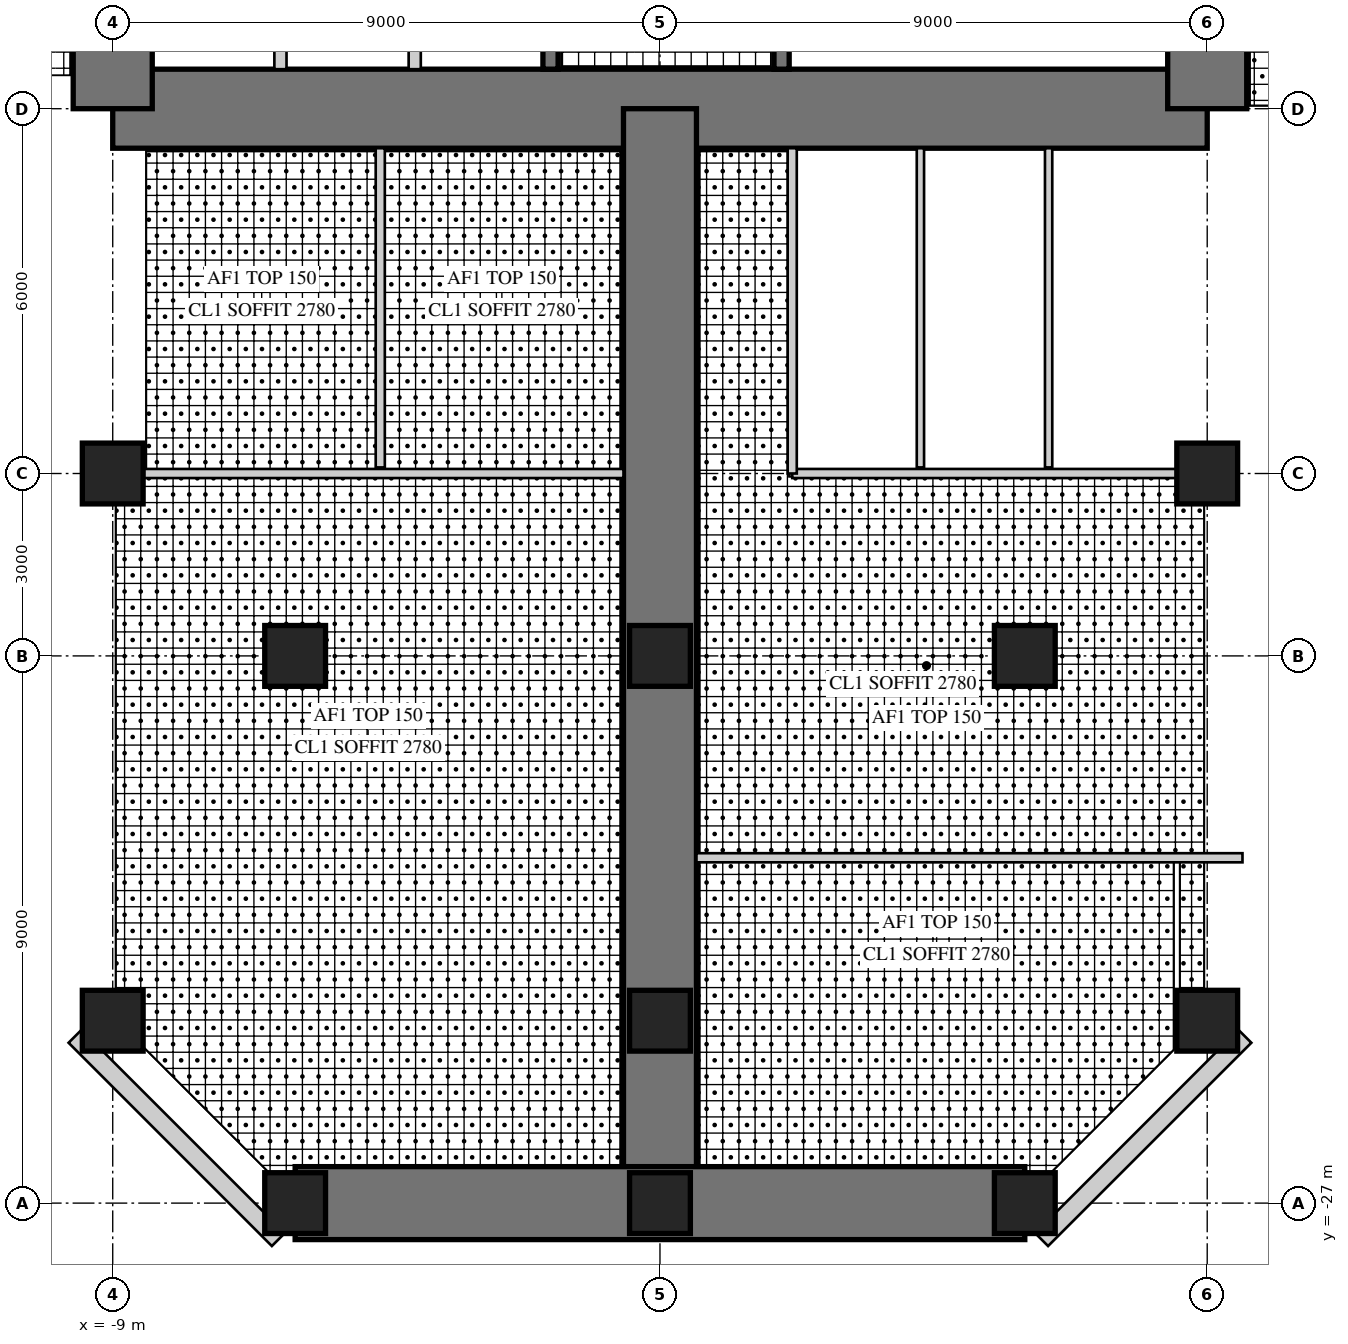
"""IFC4 building model, lengths in metres.
Left out: names, types, materials, properties, quantities, classifications, styles, units other than length and angle.
Written with IfcOpenShell. Run it as: python <this file> out.ifc"""

import sys

from ifc_helpers import new_model, si_unit, direction, frame, frame_2d, origin, origin_2d, place, context, subcontext, project, spatial, rectangle, hollow_rectangle, extrude, element, fill, save


model = new_model("IFC4")
c1 = context("Model", 3, precision=1e-05, world=origin(), true_north=direction((0.0, 1.0)))
c2 = subcontext(c1, "Body", "Model", "MODEL_VIEW")
j1 = project(units=[si_unit("LENGTHUNIT", "METRE"), si_unit("PLANEANGLEUNIT", "RADIAN")], contexts=[c1])
p1 = place(None, origin())
s1 = spatial("IfcSite", under=j1, at=p1, CompositionType="ELEMENT")
p2 = place(p1, origin())
s2 = spatial("IfcBuilding", under=s1, at=p2, CompositionType="ELEMENT")
p3 = place(p2, frame((0.0, 0.0, 116.5)))
s3 = spatial("IfcBuildingStorey", under=s2, at=p3, CompositionType="ELEMENT", Elevation=116.5)
p4 = place(p3, frame((-9.0, -9.0, 0.0), z_axis=(0.0, 0.0, 1.0), x_axis=(1.0, 0.0, 0.0)))
e1 = element("IfcWall", 1, at=p4, inside=s3, PredefinedType="SHEAR", context=c2, shape_type="SweptSolid", body=[
    extrude(rectangle(XDim=18.0, YDim=1.3, at=frame_2d((9.0, 0.0))), origin(), (0.0, 0.0, 1.0), 4.0),
])
p5 = place(p4, frame((9.8, 0.0, 0.0)))
e2 = element("IfcOpeningElement", 2, at=p5, cuts=e1, PredefinedType="OPENING", context=c2, shape_type="SweptSolid", body=[
    extrude(rectangle(XDim=1.0, YDim=2.4, at=frame_2d((0.5, 1.2))), frame((0.0, 0.66, 0.0), z_axis=(0.0, -1.0, 0.0), x_axis=(1.0, 0.0, 0.0)), (0.0, 0.0, 1.0), 1.32),
])
p6 = place(p3, frame((9.0, -9.0, 0.0), z_axis=(0.0, 0.0, 1.0), x_axis=(0.0, 1.0, 0.0)))
e3 = element("IfcWall", 3, at=p6, inside=s3, PredefinedType="SHEAR", context=c2, shape_type="SweptSolid", body=[
    extrude(rectangle(XDim=18.0, YDim=1.3, at=frame_2d((9.0, 0.0))), origin(), (0.0, 0.0, 1.0), 4.0),
])
p7 = place(p6, frame((9.8, 0.0, 0.0)))
e4 = element("IfcOpeningElement", 4, at=p7, cuts=e3, PredefinedType="OPENING", context=c2, shape_type="SweptSolid", body=[
    extrude(rectangle(XDim=1.0, YDim=2.4, at=frame_2d((0.5, 1.2))), frame((0.0, 0.66, 0.0), z_axis=(0.0, -1.0, 0.0), x_axis=(1.0, 0.0, 0.0)), (0.0, 0.0, 1.0), 1.32),
])
p8 = place(p3, frame((-9.0, 9.0, 0.0), z_axis=(0.0, 0.0, 1.0), x_axis=(0.0, -1.0, 0.0)))
e5 = element("IfcWall", 5, at=p8, inside=s3, PredefinedType="SHEAR", context=c2, shape_type="SweptSolid", body=[
    extrude(rectangle(XDim=18.0, YDim=1.3, at=frame_2d((9.0, 0.0))), origin(), (0.0, 0.0, 1.0), 4.0),
])
p9 = place(p8, frame((9.8, 0.0, 0.0)))
e6 = element("IfcOpeningElement", 6, at=p9, cuts=e5, PredefinedType="OPENING", context=c2, shape_type="SweptSolid", body=[
    extrude(rectangle(XDim=1.0, YDim=2.4, at=frame_2d((0.5, 1.2))), frame((0.0, 0.66, 0.0), z_axis=(0.0, -1.0, 0.0), x_axis=(1.0, 0.0, 0.0)), (0.0, 0.0, 1.0), 1.32),
])
p10 = place(p3, frame((-1.8, -1.875, 0.0), z_axis=(0.0, 0.0, 1.0), x_axis=(0.0, -1.0, 0.0)))
e7 = element("IfcWall", 7, at=p10, inside=s3, PredefinedType="SHEAR", context=c2, shape_type="SweptSolid", body=[
    extrude(rectangle(XDim=6.475, YDim=0.25, at=frame_2d((3.238, 0.0))), origin(), (0.0, 0.0, 1.0), 4.0),
])
p11 = place(p10, frame((1.875, 0.0, 0.0)))
e8 = element("IfcOpeningElement", 8, at=p11, cuts=e7, PredefinedType="OPENING", context=c2, shape_type="SweptSolid", body=[
    extrude(rectangle(XDim=1.6, YDim=2.4, at=frame_2d((0.8, 1.2))), frame((0.0, 0.135, 0.0), z_axis=(0.0, -1.0, 0.0), x_axis=(1.0, 0.0, 0.0)), (0.0, 0.0, 1.0), 0.27),
])
for number, where, z_axis, x_axis in (
    (9, (-4.033, -5.975, 0.0), (0.0, 0.0, 1.0), (0.0, -1.0, 0.0)),
    (10, (-6.242, -5.975, 0.0), (0.0, 0.0, 1.0), (0.0, -1.0, 0.0)),
):
    element("IfcWall", number, at=place(p3, frame(where, z_axis=z_axis, x_axis=x_axis)), inside=s3, PredefinedType="PARTITIONING", context=c2, shape_type="SweptSolid", body=[
        extrude(rectangle(XDim=2.375, YDim=0.2, at=frame_2d((1.188, 0.0))), origin(), (0.0, 0.0, 1.0), 4.0),
    ])
p12 = place(p3, frame((2.0, -1.675, 0.0), z_axis=(0.0, 0.0, 1.0), x_axis=(0.0, -1.0, 0.0)))
e11 = element("IfcWall", 11, at=p12, inside=s3, PredefinedType="SHEAR", context=c2, shape_type="SweptSolid", body=[
    extrude(rectangle(XDim=6.675, YDim=0.25, at=frame_2d((3.337, 0.0))), origin(), (0.0, 0.0, 1.0), 4.0),
])
p13 = place(p12, frame((0.725, 0.0, 0.0)))
e12 = element("IfcOpeningElement", 12, at=p13, cuts=e11, PredefinedType="OPENING", context=c2, shape_type="SweptSolid", body=[
    extrude(rectangle(XDim=1.0, YDim=2.1, at=frame_2d((0.5, 1.05))), frame((0.0, 0.135, 0.0), z_axis=(0.0, -1.0, 0.0), x_axis=(1.0, 0.0, 0.0)), (0.0, 0.0, 1.0), 0.27),
])
p14 = place(p3, frame((0.0, -9.0, 0.0), z_axis=(0.0, 0.0, 1.0), x_axis=(0.0, -1.0, 0.0)))
e13 = element("IfcWall", 13, at=p14, inside=s3, PredefinedType="SHEAR", context=c2, shape_type="SweptSolid", body=[
    extrude(rectangle(XDim=18.0, YDim=1.2, at=frame_2d((9.0, 0.0))), origin(), (0.0, 0.0, 1.0), 4.0),
])
p15 = place(p14, frame((9.8, 0.0, 0.0)))
e14 = element("IfcOpeningElement", 14, at=p15, cuts=e13, PredefinedType="OPENING", context=c2, shape_type="SweptSolid", body=[
    extrude(rectangle(XDim=1.0, YDim=2.2, at=frame_2d((0.5, 1.1))), frame((0.0, 0.61, 0.0), z_axis=(0.0, -1.0, 0.0), x_axis=(1.0, 0.0, 0.0)), (0.0, 0.0, 1.0), 1.22),
])
p16 = place(p3, frame((-6.0, -27.0, 0.0), z_axis=(0.0, 0.0, 1.0), x_axis=(1.0, 0.0, 0.0)))
e15 = element("IfcWall", 15, at=p16, inside=s3, PredefinedType="SHEAR", context=c2, shape_type="SweptSolid", body=[
    extrude(rectangle(XDim=12.0, YDim=1.2, at=frame_2d((6.0, 0.0))), origin(), (0.0, 0.0, 1.0), 4.0),
])
p17 = place(p16, frame((1.55, 0.0, 0.6)))
e16 = element("IfcOpeningElement", 16, at=p17, cuts=e15, PredefinedType="OPENING", context=c2, shape_type="SweptSolid", body=[
    extrude(rectangle(XDim=3.0, YDim=2.4, at=frame_2d((1.5, 1.2))), frame((0.0, 0.61, 0.0), z_axis=(0.0, -1.0, 0.0), x_axis=(1.0, 0.0, 0.0)), (0.0, 0.0, 1.0), 1.22),
])
p18 = place(p16, frame((7.45, 0.0, 0.6)))
e17 = element("IfcOpeningElement", 17, at=p18, cuts=e15, PredefinedType="OPENING", context=c2, shape_type="SweptSolid", body=[
    extrude(rectangle(XDim=3.0, YDim=2.4, at=frame_2d((1.5, 1.2))), frame((0.0, 0.61, 0.0), z_axis=(0.0, -1.0, 0.0), x_axis=(1.0, 0.0, 0.0)), (0.0, 0.0, 1.0), 1.22),
])
for number, where, z_axis, x_axis in (
    (18, (-9.0, -15.0, 0.0), (0.0, 0.0, 1.0), (1.0, 0.0, 0.0)),
    (19, (-9.0, -24.0, 0.0), (0.0, 0.0, 1.0), (1.0, 0.0, 0.0)),
    (20, (9.0, -15.0, 0.0), (0.0, 0.0, 1.0), (1.0, 0.0, 0.0)),
    (21, (9.0, -24.0, 0.0), (0.0, 0.0, 1.0), (1.0, 0.0, 0.0)),
    (22, (-6.0, -27.0, 0.0), (0.0, 0.0, 1.0), (1.0, 0.0, 0.0)),
    (23, (0.0, -27.0, 0.0), (0.0, 0.0, 1.0), (1.0, 0.0, 0.0)),
    (24, (6.0, -27.0, 0.0), (0.0, 0.0, 1.0), (1.0, 0.0, 0.0)),
    (25, (-6.0, -18.0, 0.0), (0.0, 0.0, 1.0), (1.0, 0.0, 0.0)),
    (26, (0.0, -18.0, 0.0), (0.0, 0.0, 1.0), (1.0, 0.0, 0.0)),
    (27, (6.0, -18.0, 0.0), (0.0, 0.0, 1.0), (1.0, 0.0, 0.0)),
    (28, (0.0, -24.0, 0.0), (0.0, 0.0, 1.0), (1.0, 0.0, 0.0)),
):
    element("IfcColumn", number, at=place(p3, frame(where, z_axis=z_axis, x_axis=x_axis)), inside=s3, PredefinedType="COLUMN", context=c2, shape_type="SweptSolid", body=[
        extrude(rectangle(XDim=1.0, YDim=1.0, at=origin_2d()), origin(), (0.0, 0.0, 1.0), 4.0),
    ])
p19 = place(p3, frame((-9.62, -24.257, 0.0), z_axis=(0.0, 0.0, 1.0), x_axis=(0.707106781187, -0.707106781187, 0.0)))
e29 = element("IfcWall", 29, at=p19, inside=s3, PredefinedType="SOLIDWALL", context=c2, shape_type="SweptSolid", body=[
    extrude(rectangle(XDim=4.728, YDim=0.3, at=frame_2d((2.364, 0.0))), origin(), (0.0, 0.0, 1.0), 3.8),
])
p20 = place(p19, frame((1.914, 0.0, 0.3)))
e30 = element("IfcOpeningElement", 30, at=p20, cuts=e29, PredefinedType="OPENING", context=c2, shape_type="SweptSolid", body=[
    extrude(rectangle(XDim=0.9, YDim=2.4, at=frame_2d((0.45, 1.2))), frame((0.0, 0.16, 0.0), z_axis=(0.0, -1.0, 0.0), x_axis=(1.0, 0.0, 0.0)), (0.0, 0.0, 1.0), 0.32),
])
p21 = place(p3, frame((6.277, -27.6, 0.0), z_axis=(0.0, 0.0, 1.0), x_axis=(0.707106781187, 0.707106781187, 0.0)))
e31 = element("IfcWall", 31, at=p21, inside=s3, PredefinedType="SOLIDWALL", context=c2, shape_type="SweptSolid", body=[
    extrude(rectangle(XDim=4.728, YDim=0.3, at=frame_2d((2.364, 0.0))), origin(), (0.0, 0.0, 1.0), 3.8),
])
p22 = place(p21, frame((1.914, 0.0, 0.3)))
e32 = element("IfcOpeningElement", 32, at=p22, cuts=e31, PredefinedType="OPENING", context=c2, shape_type="SweptSolid", body=[
    extrude(rectangle(XDim=0.9, YDim=2.4, at=frame_2d((0.45, 1.2))), frame((0.0, 0.16, 0.0), z_axis=(0.0, -1.0, 0.0), x_axis=(1.0, 0.0, 0.0)), (0.0, 0.0, 1.0), 0.32),
])
p23 = place(p3, frame((2.175, -15.0, 0.0), z_axis=(0.0, 0.0, 1.0), x_axis=(1.0, 0.0, 0.0)))
e33 = element("IfcWall", 33, at=p23, inside=s3, PredefinedType="PARTITIONING", context=c2, shape_type="SweptSolid", body=[
    extrude(rectangle(XDim=6.325, YDim=0.15, at=frame_2d((3.163, 0.0))), origin(), (0.0, 0.0, 1.0), 3.0),
])
p24 = place(p23, frame((0.554, 0.0, 0.0)))
e34 = element("IfcOpeningElement", 34, at=p24, cuts=e33, PredefinedType="OPENING", context=c2, shape_type="SweptSolid", body=[
    extrude(rectangle(XDim=1.0, YDim=2.1, at=frame_2d((0.5, 1.05))), frame((0.0, 0.085, 0.0), z_axis=(0.0, -1.0, 0.0), x_axis=(1.0, 0.0, 0.0)), (0.0, 0.0, 1.0), 0.17),
])
p25 = place(p23, frame((2.663, 0.0, 0.0)))
e35 = element("IfcOpeningElement", 35, at=p25, cuts=e33, PredefinedType="OPENING", context=c2, shape_type="SweptSolid", body=[
    extrude(rectangle(XDim=1.0, YDim=2.1, at=frame_2d((0.5, 1.05))), frame((0.0, 0.085, 0.0), z_axis=(0.0, -1.0, 0.0), x_axis=(1.0, 0.0, 0.0)), (0.0, 0.0, 1.0), 0.17),
])
p26 = place(p23, frame((4.771, 0.0, 0.0)))
e36 = element("IfcOpeningElement", 36, at=p26, cuts=e33, PredefinedType="OPENING", context=c2, shape_type="SweptSolid", body=[
    extrude(rectangle(XDim=1.0, YDim=2.1, at=frame_2d((0.5, 1.05))), frame((0.0, 0.085, 0.0), z_axis=(0.0, -1.0, 0.0), x_axis=(1.0, 0.0, 0.0)), (0.0, 0.0, 1.0), 0.17),
])
p27 = place(p3, frame((2.175, -9.65, 0.0), z_axis=(0.0, 0.0, 1.0), x_axis=(0.0, -1.0, 0.0)))
e37 = element("IfcWall", 37, at=p27, inside=s3, PredefinedType="PARTITIONING", context=c2, shape_type="SweptSolid", body=[
    extrude(rectangle(XDim=5.35, YDim=0.15, at=frame_2d((2.675, 0.0))), origin(), (0.0, 0.0, 1.0), 3.8),
])
for number, where, z_axis, x_axis in (
    (38, (4.283, -9.65, 0.0), (0.0, 0.0, 1.0), (0.0, -1.0, 0.0)),
    (39, (6.392, -9.65, 0.0), (0.0, 0.0, 1.0), (0.0, -1.0, 0.0)),
):
    element("IfcWall", number, at=place(p3, frame(where, z_axis=z_axis, x_axis=x_axis)), inside=s3, PredefinedType="PLUMBINGWALL", context=c2, shape_type="SweptSolid", body=[
        extrude(rectangle(XDim=5.25, YDim=0.12, at=frame_2d((2.625, 0.0))), origin(), (0.0, 0.0, 1.0), 3.8),
    ])
p28 = place(p3, frame((-8.5, -15.0, 0.0), z_axis=(0.0, 0.0, 1.0), x_axis=(1.0, 0.0, 0.0)))
e40 = element("IfcWall", 40, at=p28, inside=s3, PredefinedType="PARTITIONING", context=c2, shape_type="SweptSolid", body=[
    extrude(rectangle(XDim=7.9, YDim=0.15, at=frame_2d((3.95, 0.0))), origin(), (0.0, 0.0, 1.0), 3.0),
])
p29 = place(p28, frame((1.45, 0.0, 0.0)))
e41 = element("IfcOpeningElement", 41, at=p29, cuts=e40, PredefinedType="OPENING", context=c2, shape_type="SweptSolid", body=[
    extrude(rectangle(XDim=1.0, YDim=2.1, at=frame_2d((0.5, 1.05))), frame((0.0, 0.085, 0.0), z_axis=(0.0, -1.0, 0.0), x_axis=(1.0, 0.0, 0.0)), (0.0, 0.0, 1.0), 0.17),
])
p30 = place(p28, frame((5.4, 0.0, 0.0)))
e42 = element("IfcOpeningElement", 42, at=p30, cuts=e40, PredefinedType="OPENING", context=c2, shape_type="SweptSolid", body=[
    extrude(rectangle(XDim=1.0, YDim=2.1, at=frame_2d((0.5, 1.05))), frame((0.0, 0.085, 0.0), z_axis=(0.0, -1.0, 0.0), x_axis=(1.0, 0.0, 0.0)), (0.0, 0.0, 1.0), 0.17),
])
p31 = place(p3, frame((-4.6, -9.65, 0.0), z_axis=(0.0, 0.0, 1.0), x_axis=(0.0, -1.0, 0.0)))
e43 = element("IfcWall", 43, at=p31, inside=s3, PredefinedType="PARTITIONING", context=c2, shape_type="SweptSolid", body=[
    extrude(rectangle(XDim=5.25, YDim=0.15, at=frame_2d((2.625, 0.0))), origin(), (0.0, 0.0, 1.0), 3.8),
])
p32 = place(p3, frame((0.6, -21.32, 0.0), z_axis=(0.0, 0.0, 1.0), x_axis=(1.0, 0.0, 0.0)))
e44 = element("IfcWall", 44, at=p32, inside=s3, PredefinedType="PARTITIONING", context=c2, shape_type="SweptSolid", body=[
    extrude(rectangle(XDim=8.98, YDim=0.15, at=frame_2d((4.49, 0.0))), origin(), (0.0, 0.0, 1.0), 3.8),
])
p33 = place(p32, frame((0.45, 0.0, 0.0)))
e45 = element("IfcOpeningElement", 45, at=p33, cuts=e44, PredefinedType="OPENING", context=c2, shape_type="SweptSolid", body=[
    extrude(rectangle(XDim=1.0, YDim=2.2, at=frame_2d((0.5, 1.1))), frame((0.0, 0.085, 0.0), z_axis=(0.0, -1.0, 0.0), x_axis=(1.0, 0.0, 0.0)), (0.0, 0.0, 1.0), 0.17),
])
p34 = place(p20, origin())
e46 = element("IfcWindow", 46, at=p34, inside=s3, PartitioningType="SINGLE_PANEL", PredefinedType="WINDOW", context=c2, shape_type="SweptSolid", body=[
    extrude(hollow_rectangle(XDim=0.9, YDim=2.4, WallThickness=0.06, at=frame_2d((0.45, 1.2))), frame((0.0, 0.03, 0.0), z_axis=(0.0, -1.0, 0.0), x_axis=(1.0, 0.0, 0.0)), (0.0, 0.0, 1.0), 0.06),
    extrude(rectangle(XDim=0.779, YDim=2.279, at=frame_2d((0.45, 1.2))), frame((0.0, 0.03, 0.0), z_axis=(0.0, -1.0, 0.0), x_axis=(1.0, 0.0, 0.0)), (0.0, 0.0, 1.0), 0.06),
])
fill(e30, e46)
p35 = place(p17, origin())
e47 = element("IfcWindow", 47, at=p35, inside=s3, PartitioningType="SINGLE_PANEL", PredefinedType="WINDOW", context=c2, shape_type="SweptSolid", body=[
    extrude(hollow_rectangle(XDim=3.0, YDim=2.4, WallThickness=0.06, at=frame_2d((1.5, 1.2))), frame((0.0, 0.03, 0.0), z_axis=(0.0, -1.0, 0.0), x_axis=(1.0, 0.0, 0.0)), (0.0, 0.0, 1.0), 0.06),
    extrude(rectangle(XDim=2.879, YDim=2.279, at=frame_2d((1.5, 1.2))), frame((0.0, 0.03, 0.0), z_axis=(0.0, -1.0, 0.0), x_axis=(1.0, 0.0, 0.0)), (0.0, 0.0, 1.0), 0.06),
])
fill(e16, e47)
p36 = place(p18, origin())
e48 = element("IfcWindow", 48, at=p36, inside=s3, PartitioningType="SINGLE_PANEL", PredefinedType="WINDOW", context=c2, shape_type="SweptSolid", body=[
    extrude(hollow_rectangle(XDim=3.0, YDim=2.4, WallThickness=0.06, at=frame_2d((1.5, 1.2))), frame((0.0, 0.03, 0.0), z_axis=(0.0, -1.0, 0.0), x_axis=(1.0, 0.0, 0.0)), (0.0, 0.0, 1.0), 0.06),
    extrude(rectangle(XDim=2.879, YDim=2.279, at=frame_2d((1.5, 1.2))), frame((0.0, 0.03, 0.0), z_axis=(0.0, -1.0, 0.0), x_axis=(1.0, 0.0, 0.0)), (0.0, 0.0, 1.0), 0.06),
])
fill(e17, e48)
p37 = place(p22, origin())
e49 = element("IfcWindow", 49, at=p37, inside=s3, PartitioningType="SINGLE_PANEL", PredefinedType="WINDOW", context=c2, shape_type="SweptSolid", body=[
    extrude(hollow_rectangle(XDim=0.9, YDim=2.4, WallThickness=0.06, at=frame_2d((0.45, 1.2))), frame((0.0, 0.03, 0.0), z_axis=(0.0, -1.0, 0.0), x_axis=(1.0, 0.0, 0.0)), (0.0, 0.0, 1.0), 0.06),
    extrude(rectangle(XDim=0.779, YDim=2.279, at=frame_2d((0.45, 1.2))), frame((0.0, 0.03, 0.0), z_axis=(0.0, -1.0, 0.0), x_axis=(1.0, 0.0, 0.0)), (0.0, 0.0, 1.0), 0.06),
])
fill(e32, e49)
p38 = place(p24, origin())
e50 = element("IfcDoor", 50, at=p38, inside=s3, OperationType="SINGLE_SWING_LEFT", PredefinedType="DOOR", context=c2, shape_type="SweptSolid", body=[
    extrude(rectangle(XDim=1.0, YDim=2.1, at=frame_2d((0.5, 1.05))), frame((0.0, 0.025, 0.0), z_axis=(0.0, -1.0, 0.0), x_axis=(1.0, 0.0, 0.0)), (0.0, 0.0, 1.0), 0.05),
])
fill(e34, e50)
p39 = place(p25, origin())
e51 = element("IfcDoor", 51, at=p39, inside=s3, OperationType="SINGLE_SWING_LEFT", PredefinedType="DOOR", context=c2, shape_type="SweptSolid", body=[
    extrude(rectangle(XDim=1.0, YDim=2.1, at=frame_2d((0.5, 1.05))), frame((0.0, 0.025, 0.0), z_axis=(0.0, -1.0, 0.0), x_axis=(1.0, 0.0, 0.0)), (0.0, 0.0, 1.0), 0.05),
])
fill(e35, e51)
p40 = place(p26, origin())
e52 = element("IfcDoor", 52, at=p40, inside=s3, OperationType="SINGLE_SWING_LEFT", PredefinedType="DOOR", context=c2, shape_type="SweptSolid", body=[
    extrude(rectangle(XDim=1.0, YDim=2.1, at=frame_2d((0.5, 1.05))), frame((0.0, 0.025, 0.0), z_axis=(0.0, -1.0, 0.0), x_axis=(1.0, 0.0, 0.0)), (0.0, 0.0, 1.0), 0.05),
])
fill(e36, e52)
p41 = place(p29, origin())
e53 = element("IfcDoor", 53, at=p41, inside=s3, OperationType="SINGLE_SWING_RIGHT", PredefinedType="DOOR", context=c2, shape_type="SweptSolid", body=[
    extrude(rectangle(XDim=1.0, YDim=2.1, at=frame_2d((0.5, 1.05))), frame((0.0, 0.025, 0.0), z_axis=(0.0, -1.0, 0.0), x_axis=(1.0, 0.0, 0.0)), (0.0, 0.0, 1.0), 0.05),
])
fill(e41, e53)
p42 = place(p30, origin())
e54 = element("IfcDoor", 54, at=p42, inside=s3, OperationType="SINGLE_SWING_LEFT", PredefinedType="DOOR", context=c2, shape_type="SweptSolid", body=[
    extrude(rectangle(XDim=1.0, YDim=2.1, at=frame_2d((0.5, 1.05))), frame((0.0, 0.025, 0.0), z_axis=(0.0, -1.0, 0.0), x_axis=(1.0, 0.0, 0.0)), (0.0, 0.0, 1.0), 0.05),
])
fill(e42, e54)
p43 = place(p33, frame((1.0, 0.0, 0.0), z_axis=(0.0, 0.0, 1.0), x_axis=(-1.0, 0.0, 0.0)))
e55 = element("IfcDoor", 55, at=p43, inside=s3, OperationType="SINGLE_SWING_RIGHT", PredefinedType="DOOR", context=c2, shape_type="SweptSolid", body=[
    extrude(rectangle(XDim=1.0, YDim=2.2, at=frame_2d((0.5, 1.1))), frame((0.0, 0.025, 0.0), z_axis=(0.0, -1.0, 0.0), x_axis=(1.0, 0.0, 0.0)), (0.0, 0.0, 1.0), 0.05),
])
fill(e45, e55)
p44 = place(p15, origin())
e56 = element("IfcDoor", 56, at=p44, inside=s3, OperationType="SINGLE_SWING_RIGHT", PredefinedType="DOOR", context=c2, shape_type="SweptSolid", body=[
    extrude(rectangle(XDim=1.0, YDim=2.2, at=frame_2d((0.5, 1.1))), frame((0.0, 0.025, 0.0), z_axis=(0.0, -1.0, 0.0), x_axis=(1.0, 0.0, 0.0)), (0.0, 0.0, 1.0), 0.05),
])
fill(e14, e56)
p45 = place(p5, frame((1.0, 0.0, 0.0), z_axis=(0.0, 0.0, 1.0), x_axis=(-1.0, 0.0, 0.0)))
e57 = element("IfcDoor", 57, at=p45, inside=s3, OperationType="SINGLE_SWING_RIGHT", PredefinedType="DOOR", context=c2, shape_type="SweptSolid", body=[
    extrude(rectangle(XDim=1.0, YDim=2.4, at=frame_2d((0.5, 1.2))), frame((0.0, -0.005, 0.0), z_axis=(0.0, -1.0, 0.0), x_axis=(1.0, 0.0, 0.0)), (0.0, 0.0, 1.0), 0.05),
])
fill(e2, e57)
save(model, sys.argv[1])
